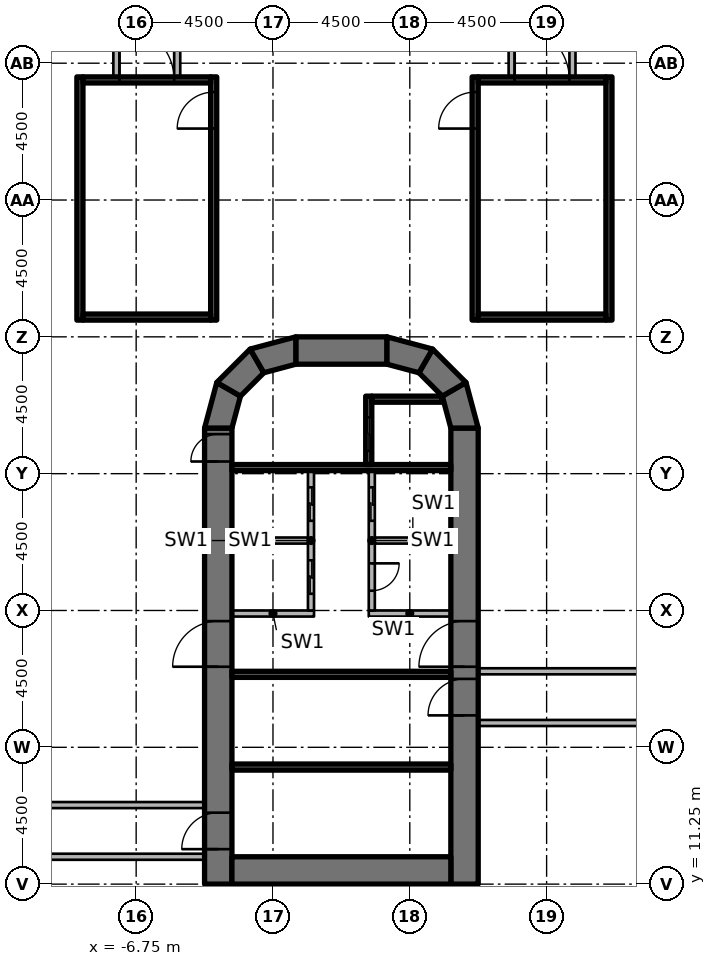
"""IFC4 building model, lengths in metres.
Left out: names, types, materials, properties, quantities, classifications, styles, units other than length and angle.
Written with IfcOpenShell. Run it as: python <this file> out.ifc"""

import sys

from ifc_helpers import new_model, si_unit, direction, frame, frame_2d, origin, origin_2d, place, context, subcontext, project, spatial, polyline, rectangle, outline, extrude, element, fill, save


model = new_model("IFC4")
c1 = context("Model", 3, precision=1e-05, world=origin(), true_north=direction((0.0, 1.0)))
c2 = subcontext(c1, "Body", "Model", "MODEL_VIEW")
j1 = project(units=[si_unit("LENGTHUNIT", "METRE"), si_unit("PLANEANGLEUNIT", "RADIAN")], contexts=[c1])
p1 = place(None, origin())
s1 = spatial("IfcSite", under=j1, at=p1, CompositionType="ELEMENT")
p2 = place(p1, origin())
s2 = spatial("IfcBuilding", under=s1, at=p2, CompositionType="ELEMENT")
p3 = place(p2, origin())
s3 = spatial("IfcBuildingStorey", under=s2, at=p3, CompositionType="ELEMENT", Elevation=0.0)
for number, where, z_axis, x_axis in (
    (1, (-6.25, 10.75, 0.0), (0.0, 0.0, 1.0), (1.0, 0.0, 0.0)),
    (2, (-6.25, 15.75, 0.0), (0.0, 0.0, 1.0), (1.0, 0.0, 0.0)),
    (3, (-6.25, 20.25, 0.0), (0.0, 0.0, 1.0), (1.0, 0.0, 0.0)),
    (4, (-6.25, 24.65, 0.0), (0.0, 0.0, 1.0), (1.0, 0.0, 0.0)),
    (5, (-6.25, 26.7, 0.0), (0.0, 0.0, 1.0), (1.0, 0.0, 0.0)),
    (6, (-2.25, 33.11, 0.0), (0.0, 0.0, 1.0), (1.0, 0.0, 0.0)),
    (7, (2.25, 33.11, 0.0), (0.0, 0.0, 1.0), (1.0, 0.0, 0.0)),
    (8, (6.25, 10.75, 0.0), (0.0, 0.0, 1.0), (1.0, 0.0, 0.0)),
    (9, (6.25, 15.75, 0.0), (0.0, 0.0, 1.0), (1.0, 0.0, 0.0)),
    (10, (6.25, 20.25, 0.0), (0.0, 0.0, 1.0), (1.0, 0.0, 0.0)),
    (11, (6.25, 24.65, 0.0), (0.0, 0.0, 1.0), (1.0, 0.0, 0.0)),
    (12, (6.25, 26.7, 0.0), (0.0, 0.0, 1.0), (1.0, 0.0, 0.0)),
):
    element("IfcColumn", number, at=place(p3, frame(where, z_axis=z_axis, x_axis=x_axis)), inside=s3, PredefinedType="COLUMN", context=c2, shape_type="SweptSolid", body=[
        extrude(rectangle(XDim=1.2, YDim=1.2, at=origin_2d()), origin(), (0.0, 0.0, 1.0), 6.55),
    ])
p4 = place(p3, frame((-4.05, 11.25, 0.0), z_axis=(0.0, 0.0, 1.0), x_axis=(0.0, 1.0, 0.0)))
e13 = element("IfcWall", 13, at=p4, inside=s3, PredefinedType="SHEAR", context=c2, shape_type="SweptSolid", body=[
    extrude(rectangle(XDim=15.0, YDim=0.9, at=frame_2d((7.5, 0.0))), origin(), (0.0, 0.0, 1.0), 7.0),
])
p5 = place(p4, frame((7.15, 0.0, 0.0)))
e14 = element("IfcOpeningElement", 14, at=p5, cuts=e13, PredefinedType="OPENING", context=c2, shape_type="SweptSolid", body=[
    extrude(rectangle(XDim=1.5, YDim=2.3, at=frame_2d((0.75, 1.15))), frame((0.0, 0.46, 0.0), z_axis=(0.0, -1.0, 0.0), x_axis=(1.0, 0.0, 0.0)), (0.0, 0.0, 1.0), 0.92),
])
p6 = place(p4, frame((13.9, 0.0, 0.0)))
e15 = element("IfcOpeningElement", 15, at=p6, cuts=e13, PredefinedType="OPENING", context=c2, shape_type="SweptSolid", body=[
    extrude(rectangle(XDim=0.9, YDim=2.1, at=frame_2d((0.45, 1.05))), frame((0.0, 0.46, 0.0), z_axis=(0.0, -1.0, 0.0), x_axis=(1.0, 0.0, 0.0)), (0.0, 0.0, 1.0), 0.92),
])
p7 = place(p4, frame((1.15, 0.0, 0.0)))
e16 = element("IfcOpeningElement", 16, at=p7, cuts=e13, PredefinedType="OPENING", context=c2, shape_type="SweptSolid", body=[
    extrude(rectangle(XDim=1.2, YDim=2.1, at=frame_2d((0.6, 1.05))), frame((0.0, 0.46, 0.0), z_axis=(0.0, -1.0, 0.0), x_axis=(1.0, 0.0, 0.0)), (0.0, 0.0, 1.0), 0.92),
])
p8 = place(p3, frame((4.05, 11.25, 0.0), z_axis=(0.0, 0.0, 1.0), x_axis=(0.0, 1.0, 0.0)))
e17 = element("IfcWall", 17, at=p8, inside=s3, PredefinedType="SHEAR", context=c2, shape_type="SweptSolid", body=[
    extrude(rectangle(XDim=15.0, YDim=0.9, at=frame_2d((7.5, 0.0))), origin(), (0.0, 0.0, 1.0), 7.0),
])
p9 = place(p8, frame((7.15, 0.0, 0.0)))
e18 = element("IfcOpeningElement", 18, at=p9, cuts=e17, PredefinedType="OPENING", context=c2, shape_type="SweptSolid", body=[
    extrude(rectangle(XDim=1.5, YDim=2.3, at=frame_2d((0.75, 1.15))), frame((0.0, 0.46, 0.0), z_axis=(0.0, -1.0, 0.0), x_axis=(1.0, 0.0, 0.0)), (0.0, 0.0, 1.0), 0.92),
])
p10 = place(p8, frame((5.55, 0.0, 0.0)))
e19 = element("IfcOpeningElement", 19, at=p10, cuts=e17, PredefinedType="OPENING", context=c2, shape_type="SweptSolid", body=[
    extrude(rectangle(XDim=1.2, YDim=2.1, at=frame_2d((0.6, 1.05))), frame((0.0, 0.46, 0.0), z_axis=(0.0, -1.0, 0.0), x_axis=(1.0, 0.0, 0.0)), (0.0, 0.0, 1.0), 0.92),
])
p11 = place(p3, frame((-3.6, 11.7, 0.0), z_axis=(0.0, 0.0, 1.0), x_axis=(1.0, 0.0, 0.0)))
e20 = element("IfcWall", 20, at=p11, inside=s3, PredefinedType="SHEAR", context=c2, shape_type="SweptSolid", body=[
    extrude(rectangle(XDim=7.2, YDim=0.9, at=frame_2d((3.6, 0.0))), origin(), (0.0, 0.0, 1.0), 7.0),
])
p12 = place(p3, frame((-1.5, 28.8, 0.0), z_axis=(0.0, 0.0, 1.0), x_axis=(1.0, 0.0, 0.0)))
e21 = element("IfcWall", 21, at=p12, inside=s3, PredefinedType="SHEAR", context=c2, shape_type="SweptSolid", body=[
    extrude(rectangle(XDim=3.0, YDim=0.9, at=frame_2d((1.5, 0.0))), origin(), (0.0, 0.0, 1.0), 7.0),
])
p13 = place(p3, origin())
e22 = element("IfcWall", 22, at=p13, inside=s3, PredefinedType="SHEAR", context=c2, shape_type="SweptSolid", body=[
    extrude(outline(polyline([(-4.5, 26.25), (-4.098, 27.75), (-3.319, 27.3), (-3.6, 26.25), (-4.5, 26.25)])), origin(), (0.0, 0.0, 1.0), 7.0),
])
p14 = place(p3, origin())
e23 = element("IfcWall", 23, at=p14, inside=s3, PredefinedType="SHEAR", context=c2, shape_type="SweptSolid", body=[
    extrude(outline(polyline([(-4.098, 27.75), (-3.0, 28.848), (-2.55, 28.069), (-3.319, 27.3), (-4.098, 27.75)])), origin(), (0.0, 0.0, 1.0), 7.0),
])
p15 = place(p3, origin())
e24 = element("IfcWall", 24, at=p15, inside=s3, PredefinedType="SHEAR", context=c2, shape_type="SweptSolid", body=[
    extrude(outline(polyline([(-3.0, 28.848), (-1.5, 29.25), (-1.5, 28.35), (-2.55, 28.069), (-3.0, 28.848)])), origin(), (0.0, 0.0, 1.0), 7.0),
])
p16 = place(p3, origin())
e25 = element("IfcWall", 25, at=p16, inside=s3, PredefinedType="SHEAR", context=c2, shape_type="SweptSolid", body=[
    extrude(outline(polyline([(4.5, 26.25), (4.098, 27.75), (3.319, 27.3), (3.6, 26.25), (4.5, 26.25)])), origin(), (0.0, 0.0, 1.0), 7.0),
])
p17 = place(p3, origin())
e26 = element("IfcWall", 26, at=p17, inside=s3, PredefinedType="SHEAR", context=c2, shape_type="SweptSolid", body=[
    extrude(outline(polyline([(4.098, 27.75), (3.0, 28.848), (2.55, 28.069), (3.319, 27.3), (4.098, 27.75)])), origin(), (0.0, 0.0, 1.0), 7.0),
])
p18 = place(p3, origin())
e27 = element("IfcWall", 27, at=p18, inside=s3, PredefinedType="SHEAR", context=c2, shape_type="SweptSolid", body=[
    extrude(outline(polyline([(3.0, 28.848), (1.5, 29.25), (1.5, 28.35), (2.55, 28.069), (3.0, 28.848)])), origin(), (0.0, 0.0, 1.0), 7.0),
])
p19 = place(p3, frame((-3.6, 24.95, 0.0), z_axis=(0.0, 0.0, 1.0), x_axis=(1.0, 0.0, 0.0)))
e28 = element("IfcWall", 28, at=p19, inside=s3, PredefinedType="SHEAR", context=c2, shape_type="SweptSolid", body=[
    extrude(rectangle(XDim=7.2, YDim=0.2, at=frame_2d((3.6, 0.0))), origin(), (0.0, 0.0, 1.0), 6.55),
])
p20 = place(p3, frame((0.9, 27.3, 0.0), z_axis=(0.0, 0.0, 1.0), x_axis=(0.0, -1.0, 0.0)))
e29 = element("IfcWall", 29, at=p20, inside=s3, PredefinedType="SHEAR", context=c2, shape_type="SweptSolid", body=[
    extrude(rectangle(XDim=2.25, YDim=0.2, at=frame_2d((1.125, 0.0))), origin(), (0.0, 0.0, 1.0), 6.55),
])
p21 = place(p20, frame((0.7, 0.0, 0.0)))
e30 = element("IfcOpeningElement", 30, at=p21, cuts=e29, PredefinedType="OPENING", context=c2, shape_type="SweptSolid", body=[
    extrude(rectangle(XDim=1.1, YDim=2.3, at=frame_2d((0.55, 1.15))), frame((0.0, 0.11, 0.0), z_axis=(0.0, -1.0, 0.0), x_axis=(1.0, 0.0, 0.0)), (0.0, 0.0, 1.0), 0.22),
])
p22 = place(p3, origin())
e31 = element("IfcWall", 31, at=p22, inside=s3, PredefinedType="SHEAR", context=c2, shape_type="SweptSolid", body=[
    extrude(outline(polyline([(1.0, 27.1), (3.341, 27.1), (3.291, 27.284), (3.275, 27.3), (1.0, 27.3), (1.0, 27.1)])), origin(), (0.0, 0.0, 1.0), 6.55),
])
for number, where, z_axis, x_axis in (
    (32, (-3.6, 18.15, 0.0), (0.0, 0.0, 1.0), (1.0, 0.0, 0.0)),
    (33, (-3.6, 15.1, 0.0), (0.0, 0.0, 1.0), (1.0, 0.0, 0.0)),
):
    element("IfcWall", number, at=place(p3, frame(where, z_axis=z_axis, x_axis=x_axis)), inside=s3, PredefinedType="SHEAR", context=c2, shape_type="SweptSolid", body=[
        extrude(rectangle(XDim=7.2, YDim=0.2, at=frame_2d((3.6, 0.0))), origin(), (0.0, 0.0, 1.0), 6.55),
    ])
p23 = place(p3, frame((-3.6, 20.15, 0.0), z_axis=(0.0, 0.0, 1.0), x_axis=(1.0, 0.0, 0.0)))
e34 = element("IfcWall", 34, at=p23, inside=s3, PredefinedType="PARTITIONING", context=c2, shape_type="SweptSolid", body=[
    extrude(rectangle(XDim=2.7, YDim=0.2, at=frame_2d((1.35, 0.0))), origin(), (0.0, 0.0, 1.0), 6.55),
])
p24 = place(p3, frame((-1.0, 24.85, 0.0), z_axis=(0.0, 0.0, 1.0), x_axis=(0.0, -1.0, 0.0)))
e35 = element("IfcWall", 35, at=p24, inside=s3, PredefinedType="PARTITIONING", context=c2, shape_type="SweptSolid", body=[
    extrude(rectangle(XDim=4.6, YDim=0.2, at=frame_2d((2.3, 0.0))), origin(), (0.0, 0.0, 1.0), 6.55),
])
p25 = place(p24, frame((0.55, 0.0, 0.0)))
e36 = element("IfcOpeningElement", 36, at=p25, cuts=e35, PredefinedType="OPENING", context=c2, shape_type="SweptSolid", body=[
    extrude(rectangle(XDim=1.1, YDim=2.3, at=frame_2d((0.55, 1.15))), frame((0.0, 0.11, 0.0), z_axis=(0.0, -1.0, 0.0), x_axis=(1.0, 0.0, 0.0)), (0.0, 0.0, 1.0), 0.22),
])
p26 = place(p24, frame((2.95, 0.0, 0.0)))
e37 = element("IfcOpeningElement", 37, at=p26, cuts=e35, PredefinedType="OPENING", context=c2, shape_type="SweptSolid", body=[
    extrude(rectangle(XDim=1.1, YDim=2.3, at=frame_2d((0.55, 1.15))), frame((0.0, 0.11, 0.0), z_axis=(0.0, -1.0, 0.0), x_axis=(1.0, 0.0, 0.0)), (0.0, 0.0, 1.0), 0.22),
])
p27 = place(p3, frame((0.9, 20.15, 0.0), z_axis=(0.0, 0.0, 1.0), x_axis=(1.0, 0.0, 0.0)))
e38 = element("IfcWall", 38, at=p27, inside=s3, PredefinedType="PARTITIONING", context=c2, shape_type="SweptSolid", body=[
    extrude(rectangle(XDim=2.7, YDim=0.2, at=frame_2d((1.35, 0.0))), origin(), (0.0, 0.0, 1.0), 6.55),
])
p28 = place(p3, frame((1.0, 24.85, 0.0), z_axis=(0.0, 0.0, 1.0), x_axis=(0.0, -1.0, 0.0)))
e39 = element("IfcWall", 39, at=p28, inside=s3, PredefinedType="PARTITIONING", context=c2, shape_type="SweptSolid", body=[
    extrude(rectangle(XDim=4.6, YDim=0.2, at=frame_2d((2.3, 0.0))), origin(), (0.0, 0.0, 1.0), 6.55),
])
p29 = place(p28, frame((0.55, 0.0, 0.0)))
e40 = element("IfcOpeningElement", 40, at=p29, cuts=e39, PredefinedType="OPENING", context=c2, shape_type="SweptSolid", body=[
    extrude(rectangle(XDim=1.1, YDim=2.3, at=frame_2d((0.55, 1.15))), frame((0.0, 0.11, 0.0), z_axis=(0.0, -1.0, 0.0), x_axis=(1.0, 0.0, 0.0)), (0.0, 0.0, 1.0), 0.22),
])
p30 = place(p28, frame((3.05, 0.0, 0.0)))
e41 = element("IfcOpeningElement", 41, at=p30, cuts=e39, PredefinedType="OPENING", context=c2, shape_type="SweptSolid", body=[
    extrude(rectangle(XDim=0.9, YDim=2.1, at=frame_2d((0.45, 1.05))), frame((0.0, 0.11, 0.0), z_axis=(0.0, -1.0, 0.0), x_axis=(1.0, 0.0, 0.0)), (0.0, 0.0, 1.0), 0.22),
])
for number, where, z_axis, x_axis in (
    (42, (-3.6, 22.55, 0.0), (0.0, 0.0, 1.0), (1.0, 0.0, 0.0)),
    (43, (1.1, 22.55, 0.0), (0.0, 0.0, 1.0), (1.0, 0.0, 0.0)),
):
    element("IfcWall", number, at=place(p3, frame(where, z_axis=z_axis, x_axis=x_axis)), inside=s3, PredefinedType="PARTITIONING", context=c2, shape_type="SweptSolid", body=[
        extrude(rectangle(XDim=2.5, YDim=0.2, at=frame_2d((1.25, 0.0))), origin(), (0.0, 0.0, 1.0), 6.55),
    ])
for number, where, z_axis, x_axis in (
    (44, (4.5, 18.25, 0.0), (0.0, 0.0, 1.0), (1.0, 0.0, 0.0)),
    (45, (4.5, 16.55, 0.0), (0.0, 0.0, 1.0), (1.0, 0.0, 0.0)),
    (46, (-4.5, 12.15, 0.0), (0.0, 0.0, 1.0), (-1.0, 0.0, 0.0)),
    (47, (-4.5, 13.85, 0.0), (0.0, 0.0, 1.0), (-1.0, 0.0, 0.0)),
):
    element("IfcWall", number, at=place(p3, frame(where, z_axis=z_axis, x_axis=x_axis)), inside=s3, PredefinedType="PARTITIONING", context=c2, shape_type="SweptSolid", body=[
        extrude(rectangle(XDim=51.55, YDim=0.2, at=frame_2d((25.775, 0.0))), origin(), (0.0, 0.0, 1.0), 6.55),
    ])
p31 = place(p3, frame((-8.6, 29.8, 0.0), z_axis=(0.0, 0.0, 1.0), x_axis=(0.0, 1.0, 0.0)))
e48 = element("IfcWall", 48, at=p31, inside=s3, PredefinedType="SHEAR", context=c2, shape_type="SweptSolid", body=[
    extrude(rectangle(XDim=8.0, YDim=0.2, at=frame_2d((4.0, 0.0))), origin(), (0.0, 0.0, 1.0), 6.55),
])
p32 = place(p3, frame((-4.2, 29.8, 0.0), z_axis=(0.0, 0.0, 1.0), x_axis=(0.0, 1.0, 0.0)))
e49 = element("IfcWall", 49, at=p32, inside=s3, PredefinedType="SHEAR", context=c2, shape_type="SweptSolid", body=[
    extrude(rectangle(XDim=8.0, YDim=0.2, at=frame_2d((4.0, 0.0))), origin(), (0.0, 0.0, 1.0), 6.55),
])
p33 = place(p32, frame((6.3, 0.0, 0.0)))
e50 = element("IfcOpeningElement", 50, at=p33, cuts=e49, PredefinedType="OPENING", context=c2, shape_type="SweptSolid", body=[
    extrude(rectangle(XDim=1.2, YDim=2.1, at=frame_2d((0.6, 1.05))), frame((0.0, 0.11, 0.0), z_axis=(0.0, -1.0, 0.0), x_axis=(1.0, 0.0, 0.0)), (0.0, 0.0, 1.0), 0.22),
])
p34 = place(p3, frame((-8.5, 29.9, 0.0), z_axis=(0.0, 0.0, 1.0), x_axis=(1.0, 0.0, 0.0)))
e51 = element("IfcWall", 51, at=p34, inside=s3, PredefinedType="SHEAR", context=c2, shape_type="SweptSolid", body=[
    extrude(rectangle(XDim=4.2, YDim=0.2, at=frame_2d((2.1, 0.0))), origin(), (0.0, 0.0, 1.0), 6.55),
])
p35 = place(p3, frame((-8.5, 37.7, 0.0), z_axis=(0.0, 0.0, 1.0), x_axis=(1.0, 0.0, 0.0)))
e52 = element("IfcWall", 52, at=p35, inside=s3, PredefinedType="SHEAR", context=c2, shape_type="SweptSolid", body=[
    extrude(rectangle(XDim=4.2, YDim=0.2, at=frame_2d((2.1, 0.0))), origin(), (0.0, 0.0, 1.0), 6.55),
])
p36 = place(p35, frame((1.2, 0.0, 0.0)))
e53 = element("IfcOpeningElement", 53, at=p36, cuts=e52, PredefinedType="OPENING", context=c2, shape_type="SweptSolid", body=[
    extrude(rectangle(XDim=1.8, YDim=2.1, at=frame_2d((0.9, 1.05))), frame((0.0, 0.11, 0.0), z_axis=(0.0, -1.0, 0.0), x_axis=(1.0, 0.0, 0.0)), (0.0, 0.0, 1.0), 0.22),
])
for number, where, z_axis, x_axis in (
    (54, (-7.4, 37.6, 0.0), (0.0, 0.0, 1.0), (0.0, 1.0, 0.0)),
    (55, (-5.4, 37.6, 0.0), (0.0, 0.0, 1.0), (0.0, 1.0, 0.0)),
):
    element("IfcWall", number, at=place(p3, frame(where, z_axis=z_axis, x_axis=x_axis)), inside=s3, PredefinedType="PARTITIONING", context=c2, shape_type="SweptSolid", body=[
        extrude(rectangle(XDim=18.65, YDim=0.2, at=frame_2d((9.325, 0.0))), origin(), (0.0, 0.0, 1.0), 6.55),
    ])
p37 = place(p3, frame((4.4, 29.8, 0.0), z_axis=(0.0, 0.0, 1.0), x_axis=(0.0, 1.0, 0.0)))
e56 = element("IfcWall", 56, at=p37, inside=s3, PredefinedType="SHEAR", context=c2, shape_type="SweptSolid", body=[
    extrude(rectangle(XDim=8.0, YDim=0.2, at=frame_2d((4.0, 0.0))), origin(), (0.0, 0.0, 1.0), 6.55),
])
p38 = place(p37, frame((6.3, 0.0, 0.0)))
e57 = element("IfcOpeningElement", 57, at=p38, cuts=e56, PredefinedType="OPENING", context=c2, shape_type="SweptSolid", body=[
    extrude(rectangle(XDim=1.2, YDim=2.1, at=frame_2d((0.6, 1.05))), frame((0.0, 0.11, 0.0), z_axis=(0.0, -1.0, 0.0), x_axis=(1.0, 0.0, 0.0)), (0.0, 0.0, 1.0), 0.22),
])
p39 = place(p3, frame((8.8, 29.8, 0.0), z_axis=(0.0, 0.0, 1.0), x_axis=(0.0, 1.0, 0.0)))
e58 = element("IfcWall", 58, at=p39, inside=s3, PredefinedType="SHEAR", context=c2, shape_type="SweptSolid", body=[
    extrude(rectangle(XDim=8.0, YDim=0.2, at=frame_2d((4.0, 0.0))), origin(), (0.0, 0.0, 1.0), 6.55),
])
p40 = place(p3, frame((4.5, 29.9, 0.0), z_axis=(0.0, 0.0, 1.0), x_axis=(1.0, 0.0, 0.0)))
e59 = element("IfcWall", 59, at=p40, inside=s3, PredefinedType="SHEAR", context=c2, shape_type="SweptSolid", body=[
    extrude(rectangle(XDim=4.2, YDim=0.2, at=frame_2d((2.1, 0.0))), origin(), (0.0, 0.0, 1.0), 6.55),
])
p41 = place(p3, frame((4.5, 37.7, 0.0), z_axis=(0.0, 0.0, 1.0), x_axis=(1.0, 0.0, 0.0)))
e60 = element("IfcWall", 60, at=p41, inside=s3, PredefinedType="SHEAR", context=c2, shape_type="SweptSolid", body=[
    extrude(rectangle(XDim=4.2, YDim=0.2, at=frame_2d((2.1, 0.0))), origin(), (0.0, 0.0, 1.0), 6.55),
])
p42 = place(p41, frame((1.2, 0.0, 0.0)))
e61 = element("IfcOpeningElement", 61, at=p42, cuts=e60, PredefinedType="OPENING", context=c2, shape_type="SweptSolid", body=[
    extrude(rectangle(XDim=1.8, YDim=2.1, at=frame_2d((0.9, 1.05))), frame((0.0, 0.11, 0.0), z_axis=(0.0, -1.0, 0.0), x_axis=(1.0, 0.0, 0.0)), (0.0, 0.0, 1.0), 0.22),
])
for number, where, z_axis, x_axis in (
    (62, (5.6, 37.6, 0.0), (0.0, 0.0, 1.0), (0.0, 1.0, 0.0)),
    (63, (7.6, 37.6, 0.0), (0.0, 0.0, 1.0), (0.0, 1.0, 0.0)),
):
    element("IfcWall", number, at=place(p3, frame(where, z_axis=z_axis, x_axis=x_axis)), inside=s3, PredefinedType="PARTITIONING", context=c2, shape_type="SweptSolid", body=[
        extrude(rectangle(XDim=18.65, YDim=0.2, at=frame_2d((9.325, 0.0))), origin(), (0.0, 0.0, 1.0), 6.55),
    ])
p43 = place(p5, origin())
e64 = element("IfcDoor", 64, at=p43, inside=s3, OperationType="DOUBLE_DOOR_SINGLE_SWING", PredefinedType="DOOR", context=c2, shape_type="SweptSolid", body=[
    extrude(rectangle(XDim=1.5, YDim=2.3, at=frame_2d((0.75, 1.15))), frame((0.0, 0.025, 0.0), z_axis=(0.0, -1.0, 0.0), x_axis=(1.0, 0.0, 0.0)), (0.0, 0.0, 1.0), 0.05),
])
fill(e14, e64)
p44 = place(p9, origin())
e65 = element("IfcDoor", 65, at=p44, inside=s3, OperationType="DOUBLE_DOOR_SINGLE_SWING", PredefinedType="DOOR", context=c2, shape_type="SweptSolid", body=[
    extrude(rectangle(XDim=1.5, YDim=2.3, at=frame_2d((0.75, 1.15))), frame((0.0, 0.025, 0.0), z_axis=(0.0, -1.0, 0.0), x_axis=(1.0, 0.0, 0.0)), (0.0, 0.0, 1.0), 0.05),
])
fill(e18, e65)
p45 = place(p6, origin())
e66 = element("IfcDoor", 66, at=p45, inside=s3, OperationType="SINGLE_SWING_LEFT", PredefinedType="DOOR", context=c2, shape_type="SweptSolid", body=[
    extrude(rectangle(XDim=0.9, YDim=2.1, at=frame_2d((0.45, 1.05))), frame((0.0, 0.025, 0.0), z_axis=(0.0, -1.0, 0.0), x_axis=(1.0, 0.0, 0.0)), (0.0, 0.0, 1.0), 0.05),
])
fill(e15, e66)
p46 = place(p10, origin())
e67 = element("IfcDoor", 67, at=p46, inside=s3, OperationType="SINGLE_SWING_RIGHT", PredefinedType="DOOR", context=c2, shape_type="SweptSolid", body=[
    extrude(rectangle(XDim=1.2, YDim=2.1, at=frame_2d((0.6, 1.05))), frame((0.0, 0.025, 0.0), z_axis=(0.0, -1.0, 0.0), x_axis=(1.0, 0.0, 0.0)), (0.0, 0.0, 1.0), 0.05),
])
fill(e19, e67)
p47 = place(p7, origin())
e68 = element("IfcDoor", 68, at=p47, inside=s3, OperationType="SINGLE_SWING_LEFT", PredefinedType="DOOR", context=c2, shape_type="SweptSolid", body=[
    extrude(rectangle(XDim=1.2, YDim=2.1, at=frame_2d((0.6, 1.05))), frame((0.0, 0.025, 0.0), z_axis=(0.0, -1.0, 0.0), x_axis=(1.0, 0.0, 0.0)), (0.0, 0.0, 1.0), 0.05),
])
fill(e16, e68)
p48 = place(p21, origin())
e69 = element("IfcDoor", 69, at=p48, inside=s3, OperationType="DOUBLE_DOOR_SLIDING", PredefinedType="DOOR", context=c2, shape_type="SweptSolid", body=[
    extrude(rectangle(XDim=1.1, YDim=2.3, at=frame_2d((0.55, 1.15))), frame((0.0, 0.025, 0.0), z_axis=(0.0, -1.0, 0.0), x_axis=(1.0, 0.0, 0.0)), (0.0, 0.0, 1.0), 0.05),
])
fill(e30, e69)
p49 = place(p25, origin())
e70 = element("IfcDoor", 70, at=p49, inside=s3, OperationType="DOUBLE_DOOR_SLIDING", PredefinedType="DOOR", context=c2, shape_type="SweptSolid", body=[
    extrude(rectangle(XDim=1.1, YDim=2.3, at=frame_2d((0.55, 1.15))), frame((0.0, 0.025, 0.0), z_axis=(0.0, -1.0, 0.0), x_axis=(1.0, 0.0, 0.0)), (0.0, 0.0, 1.0), 0.05),
])
fill(e36, e70)
p50 = place(p26, origin())
e71 = element("IfcDoor", 71, at=p50, inside=s3, OperationType="DOUBLE_DOOR_SLIDING", PredefinedType="DOOR", context=c2, shape_type="SweptSolid", body=[
    extrude(rectangle(XDim=1.1, YDim=2.3, at=frame_2d((0.55, 1.15))), frame((0.0, 0.025, 0.0), z_axis=(0.0, -1.0, 0.0), x_axis=(1.0, 0.0, 0.0)), (0.0, 0.0, 1.0), 0.05),
])
fill(e37, e71)
p51 = place(p29, origin())
e72 = element("IfcDoor", 72, at=p51, inside=s3, OperationType="DOUBLE_DOOR_SLIDING", PredefinedType="DOOR", context=c2, shape_type="SweptSolid", body=[
    extrude(rectangle(XDim=1.1, YDim=2.3, at=frame_2d((0.55, 1.15))), frame((0.0, 0.025, 0.0), z_axis=(0.0, -1.0, 0.0), x_axis=(1.0, 0.0, 0.0)), (0.0, 0.0, 1.0), 0.05),
])
fill(e40, e72)
p52 = place(p30, origin())
e73 = element("IfcDoor", 73, at=p52, inside=s3, OperationType="SINGLE_SWING_RIGHT", PredefinedType="DOOR", context=c2, shape_type="SweptSolid", body=[
    extrude(rectangle(XDim=0.9, YDim=2.1, at=frame_2d((0.45, 1.05))), frame((0.0, 0.025, 0.0), z_axis=(0.0, -1.0, 0.0), x_axis=(1.0, 0.0, 0.0)), (0.0, 0.0, 1.0), 0.05),
])
fill(e41, e73)
p53 = place(p33, origin())
e74 = element("IfcDoor", 74, at=p53, inside=s3, OperationType="SINGLE_SWING_RIGHT", PredefinedType="DOOR", context=c2, shape_type="SweptSolid", body=[
    extrude(rectangle(XDim=1.2, YDim=2.1, at=frame_2d((0.6, 1.05))), frame((0.0, 0.025, 0.0), z_axis=(0.0, -1.0, 0.0), x_axis=(1.0, 0.0, 0.0)), (0.0, 0.0, 1.0), 0.05),
])
fill(e50, e74)
p54 = place(p36, origin())
e75 = element("IfcDoor", 75, at=p54, inside=s3, OperationType="DOUBLE_DOOR_SINGLE_SWING", PredefinedType="DOOR", context=c2, shape_type="SweptSolid", body=[
    extrude(rectangle(XDim=1.8, YDim=2.1, at=frame_2d((0.9, 1.05))), frame((0.0, 0.025, 0.0), z_axis=(0.0, -1.0, 0.0), x_axis=(1.0, 0.0, 0.0)), (0.0, 0.0, 1.0), 0.05),
])
fill(e53, e75)
p55 = place(p38, origin())
e76 = element("IfcDoor", 76, at=p55, inside=s3, OperationType="SINGLE_SWING_LEFT", PredefinedType="DOOR", context=c2, shape_type="SweptSolid", body=[
    extrude(rectangle(XDim=1.2, YDim=2.1, at=frame_2d((0.6, 1.05))), frame((0.0, 0.025, 0.0), z_axis=(0.0, -1.0, 0.0), x_axis=(1.0, 0.0, 0.0)), (0.0, 0.0, 1.0), 0.05),
])
fill(e57, e76)
p56 = place(p42, origin())
e77 = element("IfcDoor", 77, at=p56, inside=s3, OperationType="DOUBLE_DOOR_SINGLE_SWING", PredefinedType="DOOR", context=c2, shape_type="SweptSolid", body=[
    extrude(rectangle(XDim=1.8, YDim=2.1, at=frame_2d((0.9, 1.05))), frame((0.0, 0.025, 0.0), z_axis=(0.0, -1.0, 0.0), x_axis=(1.0, 0.0, 0.0)), (0.0, 0.0, 1.0), 0.05),
])
fill(e61, e77)
save(model, sys.argv[1])
